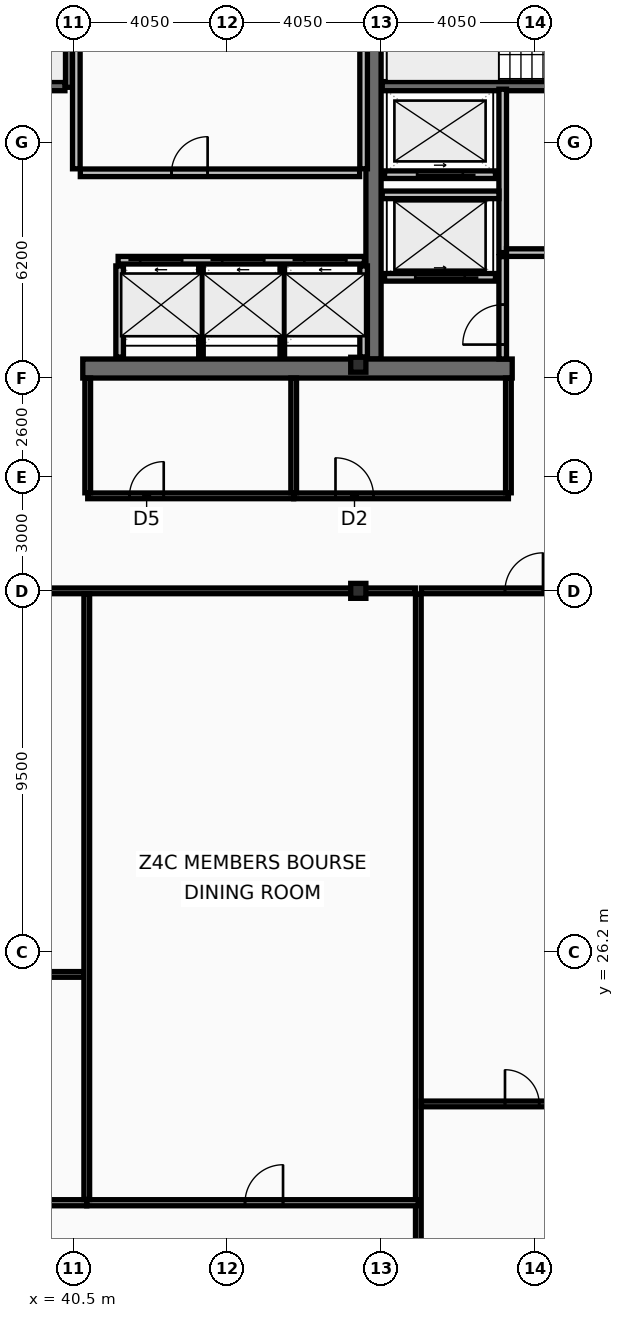
"""IFC4 building model, lengths in metres.
Left out: names, types, materials, properties, quantities, classifications, styles, units other than length and angle.
Written with IfcOpenShell. Run it as: python <this file> out.ifc"""

import sys

from ifc_helpers import new_model, si_unit, direction, frame, frame_2d, origin, origin_2d, place, context, subcontext, project, spatial, rectangle, i_section, extrude, element, fill, save


model = new_model("IFC4")
c1 = context("Model", 3, precision=1e-05, world=origin(), true_north=direction((0.0, 1.0)))
c2 = subcontext(c1, "Body", "Model", "MODEL_VIEW")
j1 = project(units=[si_unit("LENGTHUNIT", "METRE"), si_unit("PLANEANGLEUNIT", "RADIAN")], contexts=[c1])
p1 = place(None, origin())
s1 = spatial("IfcSite", under=j1, at=p1, CompositionType="ELEMENT")
p2 = place(p1, origin())
s2 = spatial("IfcBuilding", under=s1, at=p2, CompositionType="ELEMENT")
p3 = place(p2, frame((0.0, 0.0, 284.2)))
s3 = spatial("IfcBuildingStorey", under=s2, at=p3, CompositionType="ELEMENT", Elevation=284.2)
p4 = place(p3, frame((48.4, 41.8, 0.0), z_axis=(0.0, 0.0, 1.0), x_axis=(0.0, 1.0, 0.0)))
e1 = element("IfcWall", 1, at=p4, inside=s3, PredefinedType="SHEAR", context=c2, shape_type="SweptSolid", body=[
    extrude(rectangle(XDim=11.4, YDim=0.4, at=frame_2d((5.7, 0.0))), origin(), (0.0, 0.0, 1.0), 3.44),
])
p5 = place(p3, frame((52.05, 41.55, 0.0), z_axis=(0.0, 0.0, 1.0), x_axis=(-1.0, 0.0, 0.0)))
e2 = element("IfcWall", 2, at=p5, inside=s3, PredefinedType="SHEAR", context=c2, shape_type="SweptSolid", body=[
    extrude(rectangle(XDim=11.3, YDim=0.5, at=frame_2d((5.65, 0.0))), origin(), (0.0, 0.0, 1.0), 3.44),
])
p6 = place(p3, frame((40.42, 48.95, 0.0), z_axis=(0.0, 0.0, 1.0), x_axis=(0.0, 1.0, 0.0)))
e3 = element("IfcWall", 3, at=p6, inside=s3, PredefinedType="SHEAR", context=c2, shape_type="SweptSolid", body=[
    extrude(rectangle(XDim=4.25, YDim=0.26, at=frame_2d((2.125, 0.0))), origin(), (0.0, 0.0, 1.0), 3.44),
])
p7 = place(p3, frame((48.63, 48.98, 0.0), z_axis=(0.0, 0.0, 1.0), x_axis=(1.0, 0.0, 0.0)))
e4 = element("IfcWall", 4, at=p7, inside=s3, PredefinedType="SHEAR", context=c2, shape_type="SweptSolid", body=[
    extrude(rectangle(XDim=7.57, YDim=0.24, at=frame_2d((3.785, 0.0))), origin(), (0.0, 0.0, 1.0), 3.44),
])
p8 = place(p7, frame((6.3, 0.0, 0.0)))
e5 = element("IfcOpeningElement", 5, at=p8, cuts=e4, PredefinedType="OPENING", context=c2, shape_type="SweptSolid", body=[
    extrude(rectangle(XDim=1.05, YDim=2.15, at=frame_2d((0.525, 1.075))), frame((0.0, 0.13, 0.0), z_axis=(0.0, -1.0, 0.0), x_axis=(1.0, 0.0, 0.0)), (0.0, 0.0, 1.0), 0.26),
])
p9 = place(p3, frame((32.72, 48.98, 0.0), z_axis=(0.0, 0.0, 1.0), x_axis=(1.0, 0.0, 0.0)))
e6 = element("IfcWall", 6, at=p9, inside=s3, PredefinedType="SHEAR", context=c2, shape_type="SweptSolid", body=[
    extrude(rectangle(XDim=7.56, YDim=0.24, at=frame_2d((3.78, 0.0))), origin(), (0.0, 0.0, 1.0), 3.44),
])
p10 = place(p9, frame((0.22, 0.0, 0.0)))
e7 = element("IfcOpeningElement", 7, at=p10, cuts=e6, PredefinedType="OPENING", context=c2, shape_type="SweptSolid", body=[
    extrude(rectangle(XDim=1.05, YDim=2.15, at=frame_2d((0.525, 1.075))), frame((0.0, 0.13, 0.0), z_axis=(0.0, -1.0, 0.0), x_axis=(1.0, 0.0, 0.0)), (0.0, 0.0, 1.0), 0.26),
])
for number, where, z_axis, x_axis in (
    (8, (48.0, 35.7, 0.0), (0.0, 0.0, 1.0), (1.0, 0.0, 0.0)),
    (9, (48.0, 41.65, 0.0), (0.0, 0.0, 1.0), (1.0, 0.0, 0.0)),
):
    element("IfcColumn", number, at=place(p3, frame(where, z_axis=z_axis, x_axis=x_axis)), inside=s3, PredefinedType="COLUMN", context=c2, shape_type="SweptSolid", body=[
        extrude(i_section(OverallWidth=0.399, OverallDepth=0.393, WebThickness=0.023, FlangeThickness=0.037, at=origin_2d()), origin(), (0.0, 0.0, 1.0), 3.6),
    ])
p11 = place(p3, frame((41.68, 44.4, 0.0), z_axis=(0.0, 0.0, 1.0), x_axis=(1.0, 0.0, 0.0)))
e10 = element("IfcWall", 10, at=p11, inside=s3, PredefinedType="PARTITIONING", context=c2, shape_type="SweptSolid", body=[
    extrude(rectangle(XDim=6.48, YDim=0.2, at=frame_2d((3.24, 0.0))), origin(), (0.0, 0.0, 1.0), 3.44),
])
p12 = place(p11, frame((0.58, 0.0, 0.0)))
e11 = element("IfcOpeningElement", 11, at=p12, cuts=e10, PredefinedType="OPENING", context=c2, shape_type="SweptSolid", body=[
    extrude(rectangle(XDim=1.1, YDim=2.18, at=frame_2d((0.55, 1.09))), frame((0.0, 0.11, 0.0), z_axis=(0.0, -1.0, 0.0), x_axis=(1.0, 0.0, 0.0)), (0.0, 0.0, 1.0), 0.22),
])
p13 = place(p11, frame((2.74, 0.0, 0.0)))
e12 = element("IfcOpeningElement", 12, at=p13, cuts=e10, PredefinedType="OPENING", context=c2, shape_type="SweptSolid", body=[
    extrude(rectangle(XDim=1.1, YDim=2.18, at=frame_2d((0.55, 1.09))), frame((0.0, 0.11, 0.0), z_axis=(0.0, -1.0, 0.0), x_axis=(1.0, 0.0, 0.0)), (0.0, 0.0, 1.0), 0.22),
])
p14 = place(p11, frame((4.9, 0.0, 0.0)))
e13 = element("IfcOpeningElement", 13, at=p14, cuts=e10, PredefinedType="OPENING", context=c2, shape_type="SweptSolid", body=[
    extrude(rectangle(XDim=1.1, YDim=2.18, at=frame_2d((0.55, 1.09))), frame((0.0, 0.11, 0.0), z_axis=(0.0, -1.0, 0.0), x_axis=(1.0, 0.0, 0.0)), (0.0, 0.0, 1.0), 0.22),
])
p15 = place(p3, frame((51.61, 43.95, 0.0), z_axis=(0.0, 0.0, 1.0), x_axis=(-1.0, 0.0, 0.0)))
e14 = element("IfcWall", 14, at=p15, inside=s3, PredefinedType="PARTITIONING", context=c2, shape_type="SweptSolid", body=[
    extrude(rectangle(XDim=2.92, YDim=0.2, at=frame_2d((1.46, 0.0))), origin(), (0.0, 0.0, 1.0), 3.44),
])
p16 = place(p15, frame((0.81, 0.0, 0.0)))
e15 = element("IfcOpeningElement", 15, at=p16, cuts=e14, PredefinedType="OPENING", context=c2, shape_type="SweptSolid", body=[
    extrude(rectangle(XDim=1.3, YDim=2.18, at=frame_2d((0.65, 1.09))), frame((0.0, 0.11, 0.0), z_axis=(0.0, -1.0, 0.0), x_axis=(1.0, 0.0, 0.0)), (0.0, 0.0, 1.0), 0.22),
])
p17 = place(p3, frame((51.61, 46.65, 0.0), z_axis=(0.0, 0.0, 1.0), x_axis=(-1.0, 0.0, 0.0)))
e16 = element("IfcWall", 16, at=p17, inside=s3, PredefinedType="PARTITIONING", context=c2, shape_type="SweptSolid", body=[
    extrude(rectangle(XDim=2.92, YDim=0.2, at=frame_2d((1.46, 0.0))), origin(), (0.0, 0.0, 1.0), 3.44),
])
p18 = place(p17, frame((0.86, 0.0, 0.0)))
e17 = element("IfcOpeningElement", 17, at=p18, cuts=e16, PredefinedType="OPENING", context=c2, shape_type="SweptSolid", body=[
    extrude(rectangle(XDim=1.2, YDim=2.18, at=frame_2d((0.6, 1.09))), frame((0.0, 0.11, 0.0), z_axis=(0.0, -1.0, 0.0), x_axis=(1.0, 0.0, 0.0)), (0.0, 0.0, 1.0), 0.22),
])
p19 = place(p3, frame((51.8, 44.6, 0.0), z_axis=(0.0, 0.0, 1.0), x_axis=(0.0, 1.0, 0.0)))
e18 = element("IfcWall", 18, at=p19, inside=s3, PredefinedType="PARTITIONING", context=c2, shape_type="SweptSolid", body=[
    extrude(rectangle(XDim=4.3, YDim=0.2, at=frame_2d((2.15, 0.0))), origin(), (0.0, 0.0, 1.0), 3.44),
])
p20 = place(p3, frame((51.9, 44.6, 0.0), z_axis=(0.0, 0.0, 1.0), x_axis=(1.0, 0.0, 0.0)))
e19 = element("IfcWall", 19, at=p20, inside=s3, PredefinedType="PARTITIONING", context=c2, shape_type="SweptSolid", body=[
    extrude(rectangle(XDim=4.3, YDim=0.2, at=frame_2d((2.15, 0.0))), origin(), (0.0, 0.0, 1.0), 3.44),
])
p21 = place(p20, frame((1.15, 0.0, 0.0)))
e20 = element("IfcOpeningElement", 20, at=p21, cuts=e19, PredefinedType="OPENING", context=c2, shape_type="SweptSolid", body=[
    extrude(rectangle(XDim=1.05, YDim=2.15, at=frame_2d((0.525, 1.075))), frame((0.0, 0.11, 0.0), z_axis=(0.0, -1.0, 0.0), x_axis=(1.0, 0.0, 0.0)), (0.0, 0.0, 1.0), 0.22),
])
p22 = place(p3, frame((48.63, 46.12, 0.0), z_axis=(0.0, 0.0, 1.0), x_axis=(1.0, 0.0, 0.0)))
e21 = element("IfcWall", 21, at=p22, inside=s3, PredefinedType="PARTITIONING", context=c2, shape_type="SweptSolid", body=[
    extrude(rectangle(XDim=3.07, YDim=0.2, at=frame_2d((1.535, 0.0))), origin(), (0.0, 0.0, 1.0), 3.44),
])
p23 = place(p3, frame((51.8, 41.8, 0.0), z_axis=(0.0, 0.0, 1.0), x_axis=(0.0, 1.0, 0.0)))
e22 = element("IfcWall", 22, at=p23, inside=s3, PredefinedType="PARTITIONING", context=c2, shape_type="SweptSolid", body=[
    extrude(rectangle(XDim=2.695, YDim=0.2, at=frame_2d((1.348, 0.0))), origin(), (0.0, 0.0, 1.0), 3.44),
])
p24 = place(p23, frame((0.38, 0.0, 0.0)))
e23 = element("IfcOpeningElement", 23, at=p24, cuts=e22, PredefinedType="OPENING", context=c2, shape_type="SweptSolid", body=[
    extrude(rectangle(XDim=1.05, YDim=2.15, at=frame_2d((0.525, 1.075))), frame((0.0, 0.11, 0.0), z_axis=(0.0, -1.0, 0.0), x_axis=(1.0, 0.0, 0.0)), (0.0, 0.0, 1.0), 0.22),
])
for number, where, z_axis, x_axis in (
    (24, (40.58, 46.805, 0.0), (0.0, 0.0, 1.0), (0.0, 1.0, 0.0)),
    (25, (48.14, 46.805, 0.0), (0.0, 0.0, 1.0), (0.0, 1.0, 0.0)),
):
    element("IfcWall", number, at=place(p3, frame(where, z_axis=z_axis, x_axis=x_axis)), inside=s3, PredefinedType="PARTITIONING", context=c2, shape_type="SweptSolid", body=[
        extrude(rectangle(XDim=5.99, YDim=0.2, at=frame_2d((2.995, 0.0))), origin(), (0.0, 0.0, 1.0), 3.44),
    ])
p25 = place(p3, frame((40.685, 46.7, 0.0), z_axis=(0.0, 0.0, 1.0), x_axis=(1.0, 0.0, 0.0)))
e26 = element("IfcWall", 26, at=p25, inside=s3, PredefinedType="PARTITIONING", context=c2, shape_type="SweptSolid", body=[
    extrude(rectangle(XDim=7.35, YDim=0.2, at=frame_2d((3.675, 0.0))), origin(), (0.0, 0.0, 1.0), 3.44),
])
p26 = place(p25, frame((2.4, 0.0, 0.0)))
e27 = element("IfcOpeningElement", 27, at=p26, cuts=e26, PredefinedType="OPENING", context=c2, shape_type="SweptSolid", body=[
    extrude(rectangle(XDim=0.95, YDim=2.1, at=frame_2d((0.475, 1.05))), frame((0.0, 0.11, 0.0), z_axis=(0.0, -1.0, 0.0), x_axis=(1.0, 0.0, 0.0)), (0.0, 0.0, 1.0), 0.22),
])
for number, where, z_axis, x_axis in (
    (28, (41.72, 41.85, 0.0), (0.0, 0.0, 1.0), (0.0, 1.0, 0.0)),
    (29, (48.14, 41.85, 0.0), (0.0, 0.0, 1.0), (0.0, 1.0, 0.0)),
):
    element("IfcWall", number, at=place(p3, frame(where, z_axis=z_axis, x_axis=x_axis)), inside=s3, PredefinedType="PARTITIONING", context=c2, shape_type="SweptSolid", body=[
        extrude(rectangle(XDim=2.4, YDim=0.2, at=frame_2d((1.2, 0.0))), origin(), (0.0, 0.0, 1.0), 3.44),
    ])
for number, where, z_axis, x_axis in (
    (30, (43.86, 41.85, 0.0), (0.0, 0.0, 1.0), (0.0, 1.0, 0.0)),
    (31, (46.0, 41.85, 0.0), (0.0, 0.0, 1.0), (0.0, 1.0, 0.0)),
):
    element("IfcWall", number, at=place(p3, frame(where, z_axis=z_axis, x_axis=x_axis)), inside=s3, PredefinedType="PARTITIONING", context=c2, shape_type="SweptSolid", body=[
        extrude(rectangle(XDim=2.4, YDim=0.12, at=frame_2d((1.2, 0.0))), origin(), (0.0, 0.0, 1.0), 3.44),
    ])
p27 = place(p3, frame((40.88, 38.2, 0.0), z_axis=(0.0, 0.0, 1.0), x_axis=(1.0, 0.0, 0.0)))
e32 = element("IfcWall", 32, at=p27, inside=s3, PredefinedType="PARTITIONING", context=c2, shape_type="SweptSolid", body=[
    extrude(rectangle(XDim=5.42, YDim=0.15, at=frame_2d((2.71, 0.0))), origin(), (0.0, 0.0, 1.0), 2.78),
])
p28 = place(p27, frame((1.1, 0.0, 0.0)))
e33 = element("IfcOpeningElement", 33, at=p28, cuts=e32, PredefinedType="OPENING", context=c2, shape_type="SweptSolid", body=[
    extrude(rectangle(XDim=0.9, YDim=2.05, at=frame_2d((0.45, 1.025))), frame((0.0, 0.085, 0.0), z_axis=(0.0, -1.0, 0.0), x_axis=(1.0, 0.0, 0.0)), (0.0, 0.0, 1.0), 0.17),
])
p29 = place(p3, frame((46.3, 38.2, 0.0), z_axis=(0.0, 0.0, 1.0), x_axis=(1.0, 0.0, 0.0)))
e34 = element("IfcWall", 34, at=p29, inside=s3, PredefinedType="PARTITIONING", context=c2, shape_type="SweptSolid", body=[
    extrude(rectangle(XDim=5.65, YDim=0.15, at=frame_2d((2.825, 0.0))), origin(), (0.0, 0.0, 1.0), 2.78),
])
p30 = place(p29, frame((1.1, 0.0, 0.0)))
e35 = element("IfcOpeningElement", 35, at=p30, cuts=e34, PredefinedType="OPENING", context=c2, shape_type="SweptSolid", body=[
    extrude(rectangle(XDim=1.0, YDim=2.05, at=frame_2d((0.5, 1.025))), frame((0.0, 0.085, 0.0), z_axis=(0.0, -1.0, 0.0), x_axis=(1.0, 0.0, 0.0)), (0.0, 0.0, 1.0), 0.17),
])
for number, where, z_axis, x_axis in (
    (36, (40.88, 38.28, 0.0), (0.0, 0.0, 1.0), (0.0, 1.0, 0.0)),
    (37, (46.3, 38.28, 0.0), (0.0, 0.0, 1.0), (0.0, 1.0, 0.0)),
    (38, (51.95, 38.28, 0.0), (0.0, 0.0, 1.0), (0.0, 1.0, 0.0)),
):
    element("IfcWall", number, at=place(p3, frame(where, z_axis=z_axis, x_axis=x_axis)), inside=s3, PredefinedType="PARTITIONING", context=c2, shape_type="SweptSolid", body=[
        extrude(rectangle(XDim=3.02, YDim=0.15, at=frame_2d((1.51, 0.0))), origin(), (0.0, 0.0, 1.0), 3.44),
    ])
p31 = place(p3, frame((49.58, 10.665, 0.0), z_axis=(0.0, 0.0, 1.0), x_axis=(0.0, 1.0, 0.0)))
e39 = element("IfcWall", 39, at=p31, inside=s3, PredefinedType="PARTITIONING", context=c2, shape_type="SweptSolid", body=[
    extrude(rectangle(XDim=24.955, YDim=0.15, at=frame_2d((12.478, 0.0))), origin(), (0.0, 0.0, 1.0), 3.03),
])
p32 = place(p31, frame((3.2, 0.0, 0.0)))
e40 = element("IfcOpeningElement", 40, at=p32, cuts=e39, PredefinedType="OPENING", context=c2, shape_type="SweptSolid", body=[
    extrude(rectangle(XDim=1.1, YDim=2.1, at=frame_2d((0.55, 1.05))), frame((0.0, 0.085, 0.0), z_axis=(0.0, -1.0, 0.0), x_axis=(1.0, 0.0, 0.0)), (0.0, 0.0, 1.0), 0.17),
])
p33 = place(p3, frame((24.48, 35.7, 0.0), z_axis=(0.0, 0.0, 1.0), x_axis=(1.0, 0.0, 0.0)))
e41 = element("IfcWall", 41, at=p33, inside=s3, PredefinedType="PARTITIONING", context=c2, shape_type="SweptSolid", body=[
    extrude(rectangle(XDim=25.02, YDim=0.15, at=frame_2d((12.51, 0.0))), origin(), (0.0, 0.0, 1.0), 2.78),
])
p34 = place(p3, frame((49.66, 35.7, 0.0), z_axis=(0.0, 0.0, 1.0), x_axis=(1.0, 0.0, 0.0)))
e42 = element("IfcWall", 42, at=p34, inside=s3, PredefinedType="PARTITIONING", context=c2, shape_type="SweptSolid", body=[
    extrude(rectangle(XDim=13.145, YDim=0.15, at=frame_2d((6.573, 0.0))), origin(), (0.0, 0.0, 1.0), 2.78),
])
p35 = place(p34, frame((2.2, 0.0, 0.0)))
e43 = element("IfcOpeningElement", 43, at=p35, cuts=e42, PredefinedType="OPENING", context=c2, shape_type="SweptSolid", body=[
    extrude(rectangle(XDim=1.0, YDim=2.05, at=frame_2d((0.5, 1.025))), frame((0.0, 0.085, 0.0), z_axis=(0.0, -1.0, 0.0), x_axis=(1.0, 0.0, 0.0)), (0.0, 0.0, 1.0), 0.17),
])
p36 = place(p3, frame((49.66, 22.2, 0.0), z_axis=(0.0, 0.0, 1.0), x_axis=(1.0, 0.0, 0.0)))
e44 = element("IfcWall", 44, at=p36, inside=s3, PredefinedType="PARTITIONING", context=c2, shape_type="SweptSolid", body=[
    extrude(rectangle(XDim=13.145, YDim=0.15, at=frame_2d((6.573, 0.0))), origin(), (0.0, 0.0, 1.0), 2.78),
])
p37 = place(p36, frame((2.2, 0.0, 0.0)))
e45 = element("IfcOpeningElement", 45, at=p37, cuts=e44, PredefinedType="OPENING", context=c2, shape_type="SweptSolid", body=[
    extrude(rectangle(XDim=0.9, YDim=2.05, at=frame_2d((0.45, 1.025))), frame((0.0, 0.085, 0.0), z_axis=(0.0, -1.0, 0.0), x_axis=(1.0, 0.0, 0.0)), (0.0, 0.0, 1.0), 0.17),
])
p38 = place(p3, frame((34.638, 19.6, 0.0), z_axis=(0.0, 0.0, 1.0), x_axis=(1.0, 0.0, 0.0)))
e46 = element("IfcWall", 46, at=p38, inside=s3, PredefinedType="PARTITIONING", context=c2, shape_type="SweptSolid", body=[
    extrude(rectangle(XDim=6.217, YDim=0.16, at=frame_2d((3.108, 0.0))), origin(), (0.0, 0.0, 1.0), 3.44),
])
p39 = place(p38, frame((3.111, 0.0, 0.0)))
e47 = element("IfcOpeningElement", 47, at=p39, cuts=e46, PredefinedType="OPENING", context=c2, shape_type="SweptSolid", body=[
    extrude(rectangle(XDim=1.0, YDim=2.05, at=frame_2d((0.5, 1.025))), frame((0.0, 0.09, 0.0), z_axis=(0.0, -1.0, 0.0), x_axis=(1.0, 0.0, 0.0)), (0.0, 0.0, 1.0), 0.18),
])
p40 = place(p3, frame((34.718, 25.607, 0.0), z_axis=(0.0, 0.0, 1.0), x_axis=(1.0, 0.0, 0.0)))
e48 = element("IfcWall", 48, at=p40, inside=s3, PredefinedType="PARTITIONING", context=c2, shape_type="SweptSolid", body=[
    extrude(rectangle(XDim=6.057, YDim=0.15, at=frame_2d((3.028, 0.0))), origin(), (0.0, 0.0, 1.0), 3.44),
])
p41 = place(p40, frame((2.798, 0.0, 0.0)))
e49 = element("IfcOpeningElement", 49, at=p41, cuts=e48, PredefinedType="OPENING", context=c2, shape_type="SweptSolid", body=[
    extrude(rectangle(XDim=0.9, YDim=2.05, at=frame_2d((0.45, 1.025))), frame((0.0, 0.085, 0.0), z_axis=(0.0, -1.0, 0.0), x_axis=(1.0, 0.0, 0.0)), (0.0, 0.0, 1.0), 0.17),
])
p42 = place(p3, frame((40.855, 19.6, 0.0), z_axis=(0.0, 0.0, 1.0), x_axis=(1.0, 0.0, 0.0)))
e50 = element("IfcWall", 50, at=p42, inside=s3, PredefinedType="PARTITIONING", context=c2, shape_type="SweptSolid", body=[
    extrude(rectangle(XDim=8.725, YDim=0.16, at=frame_2d((4.363, 0.0))), origin(), (0.0, 0.0, 1.0), 2.78),
])
p43 = place(p42, frame((4.165, 0.0, 0.0)))
e51 = element("IfcOpeningElement", 51, at=p43, cuts=e50, PredefinedType="OPENING", context=c2, shape_type="SweptSolid", body=[
    extrude(rectangle(XDim=1.0, YDim=2.05, at=frame_2d((0.5, 1.025))), frame((0.0, 0.09, 0.0), z_axis=(0.0, -1.0, 0.0), x_axis=(1.0, 0.0, 0.0)), (0.0, 0.0, 1.0), 0.18),
])
p44 = place(p3, frame((40.855, 19.685, 0.0), z_axis=(0.0, 0.0, 1.0), x_axis=(0.0, 1.0, 0.0)))
e52 = element("IfcWall", 52, at=p44, inside=s3, PredefinedType="PARTITIONING", context=c2, shape_type="SweptSolid", body=[
    extrude(rectangle(XDim=15.935, YDim=0.15, at=frame_2d((7.968, 0.0))), origin(), (0.0, 0.0, 1.0), 3.03),
])
p45 = place(p12, origin())
e53 = element("IfcDoor", 53, at=p45, inside=s3, OperationType="SLIDING_TO_LEFT", PredefinedType="DOOR", context=c2, shape_type="SweptSolid", body=[
    extrude(rectangle(XDim=1.1, YDim=2.18, at=frame_2d((0.55, 1.09))), frame((0.0, 0.025, 0.0), z_axis=(0.0, -1.0, 0.0), x_axis=(1.0, 0.0, 0.0)), (0.0, 0.0, 1.0), 0.05),
])
fill(e11, e53)
p46 = place(p13, origin())
e54 = element("IfcDoor", 54, at=p46, inside=s3, OperationType="SLIDING_TO_LEFT", PredefinedType="DOOR", context=c2, shape_type="SweptSolid", body=[
    extrude(rectangle(XDim=1.1, YDim=2.18, at=frame_2d((0.55, 1.09))), frame((0.0, 0.025, 0.0), z_axis=(0.0, -1.0, 0.0), x_axis=(1.0, 0.0, 0.0)), (0.0, 0.0, 1.0), 0.05),
])
fill(e12, e54)
p47 = place(p14, origin())
e55 = element("IfcDoor", 55, at=p47, inside=s3, OperationType="SLIDING_TO_LEFT", PredefinedType="DOOR", context=c2, shape_type="SweptSolid", body=[
    extrude(rectangle(XDim=1.1, YDim=2.18, at=frame_2d((0.55, 1.09))), frame((0.0, 0.025, 0.0), z_axis=(0.0, -1.0, 0.0), x_axis=(1.0, 0.0, 0.0)), (0.0, 0.0, 1.0), 0.05),
])
fill(e13, e55)
p48 = place(p16, origin())
e56 = element("IfcDoor", 56, at=p48, inside=s3, OperationType="SLIDING_TO_LEFT", PredefinedType="DOOR", context=c2, shape_type="SweptSolid", body=[
    extrude(rectangle(XDim=1.3, YDim=2.18, at=frame_2d((0.65, 1.09))), frame((0.0, 0.025, 0.0), z_axis=(0.0, -1.0, 0.0), x_axis=(1.0, 0.0, 0.0)), (0.0, 0.0, 1.0), 0.05),
])
fill(e15, e56)
p49 = place(p18, origin())
e57 = element("IfcDoor", 57, at=p49, inside=s3, OperationType="SLIDING_TO_LEFT", PredefinedType="DOOR", context=c2, shape_type="SweptSolid", body=[
    extrude(rectangle(XDim=1.2, YDim=2.18, at=frame_2d((0.6, 1.09))), frame((0.0, 0.025, 0.0), z_axis=(0.0, -1.0, 0.0), x_axis=(1.0, 0.0, 0.0)), (0.0, 0.0, 1.0), 0.05),
])
fill(e17, e57)
p50 = place(p24, origin())
e58 = element("IfcDoor", 58, at=p50, inside=s3, OperationType="SINGLE_SWING_LEFT", PredefinedType="DOOR", context=c2, shape_type="SweptSolid", body=[
    extrude(rectangle(XDim=1.05, YDim=2.15, at=frame_2d((0.525, 1.075))), frame((0.0, 0.025, 0.0), z_axis=(0.0, -1.0, 0.0), x_axis=(1.0, 0.0, 0.0)), (0.0, 0.0, 1.0), 0.05),
])
fill(e23, e58)
p51 = place(p26, origin())
e59 = element("IfcDoor", 59, at=p51, inside=s3, OperationType="SINGLE_SWING_RIGHT", PredefinedType="DOOR", context=c2, shape_type="SweptSolid", body=[
    extrude(rectangle(XDim=0.95, YDim=2.1, at=frame_2d((0.475, 1.05))), frame((0.0, 0.025, 0.0), z_axis=(0.0, -1.0, 0.0), x_axis=(1.0, 0.0, 0.0)), (0.0, 0.0, 1.0), 0.05),
])
fill(e27, e59)
p52 = place(p28, origin())
e60 = element("IfcDoor", 60, at=p52, inside=s3, OperationType="SINGLE_SWING_RIGHT", PredefinedType="DOOR", context=c2, shape_type="SweptSolid", body=[
    extrude(rectangle(XDim=0.9, YDim=2.05, at=frame_2d((0.45, 1.025))), frame((0.0, 0.025, 0.0), z_axis=(0.0, -1.0, 0.0), x_axis=(1.0, 0.0, 0.0)), (0.0, 0.0, 1.0), 0.05),
])
fill(e33, e60)
p53 = place(p30, origin())
e61 = element("IfcDoor", 61, at=p53, inside=s3, OperationType="SINGLE_SWING_LEFT", PredefinedType="DOOR", context=c2, shape_type="SweptSolid", body=[
    extrude(rectangle(XDim=1.0, YDim=2.05, at=frame_2d((0.5, 1.025))), frame((0.0, 0.025, 0.0), z_axis=(0.0, -1.0, 0.0), x_axis=(1.0, 0.0, 0.0)), (0.0, 0.0, 1.0), 0.05),
])
fill(e35, e61)
p54 = place(p35, origin())
e62 = element("IfcDoor", 62, at=p54, inside=s3, OperationType="SINGLE_SWING_RIGHT", PredefinedType="DOOR", context=c2, shape_type="SweptSolid", body=[
    extrude(rectangle(XDim=1.0, YDim=2.05, at=frame_2d((0.5, 1.025))), frame((0.0, 0.025, 0.0), z_axis=(0.0, -1.0, 0.0), x_axis=(1.0, 0.0, 0.0)), (0.0, 0.0, 1.0), 0.05),
])
fill(e43, e62)
p55 = place(p37, origin())
e63 = element("IfcDoor", 63, at=p55, inside=s3, OperationType="SINGLE_SWING_LEFT", PredefinedType="DOOR", context=c2, shape_type="SweptSolid", body=[
    extrude(rectangle(XDim=0.9, YDim=2.05, at=frame_2d((0.45, 1.025))), frame((0.0, 0.025, 0.0), z_axis=(0.0, -1.0, 0.0), x_axis=(1.0, 0.0, 0.0)), (0.0, 0.0, 1.0), 0.05),
])
fill(e45, e63)
p56 = place(p43, origin())
e64 = element("IfcDoor", 64, at=p56, inside=s3, OperationType="SINGLE_SWING_RIGHT", PredefinedType="DOOR", context=c2, shape_type="SweptSolid", body=[
    extrude(rectangle(XDim=1.0, YDim=2.05, at=frame_2d((0.5, 1.025))), frame((0.0, 0.025, 0.0), z_axis=(0.0, -1.0, 0.0), x_axis=(1.0, 0.0, 0.0)), (0.0, 0.0, 1.0), 0.05),
])
fill(e51, e64)
save(model, sys.argv[1])
